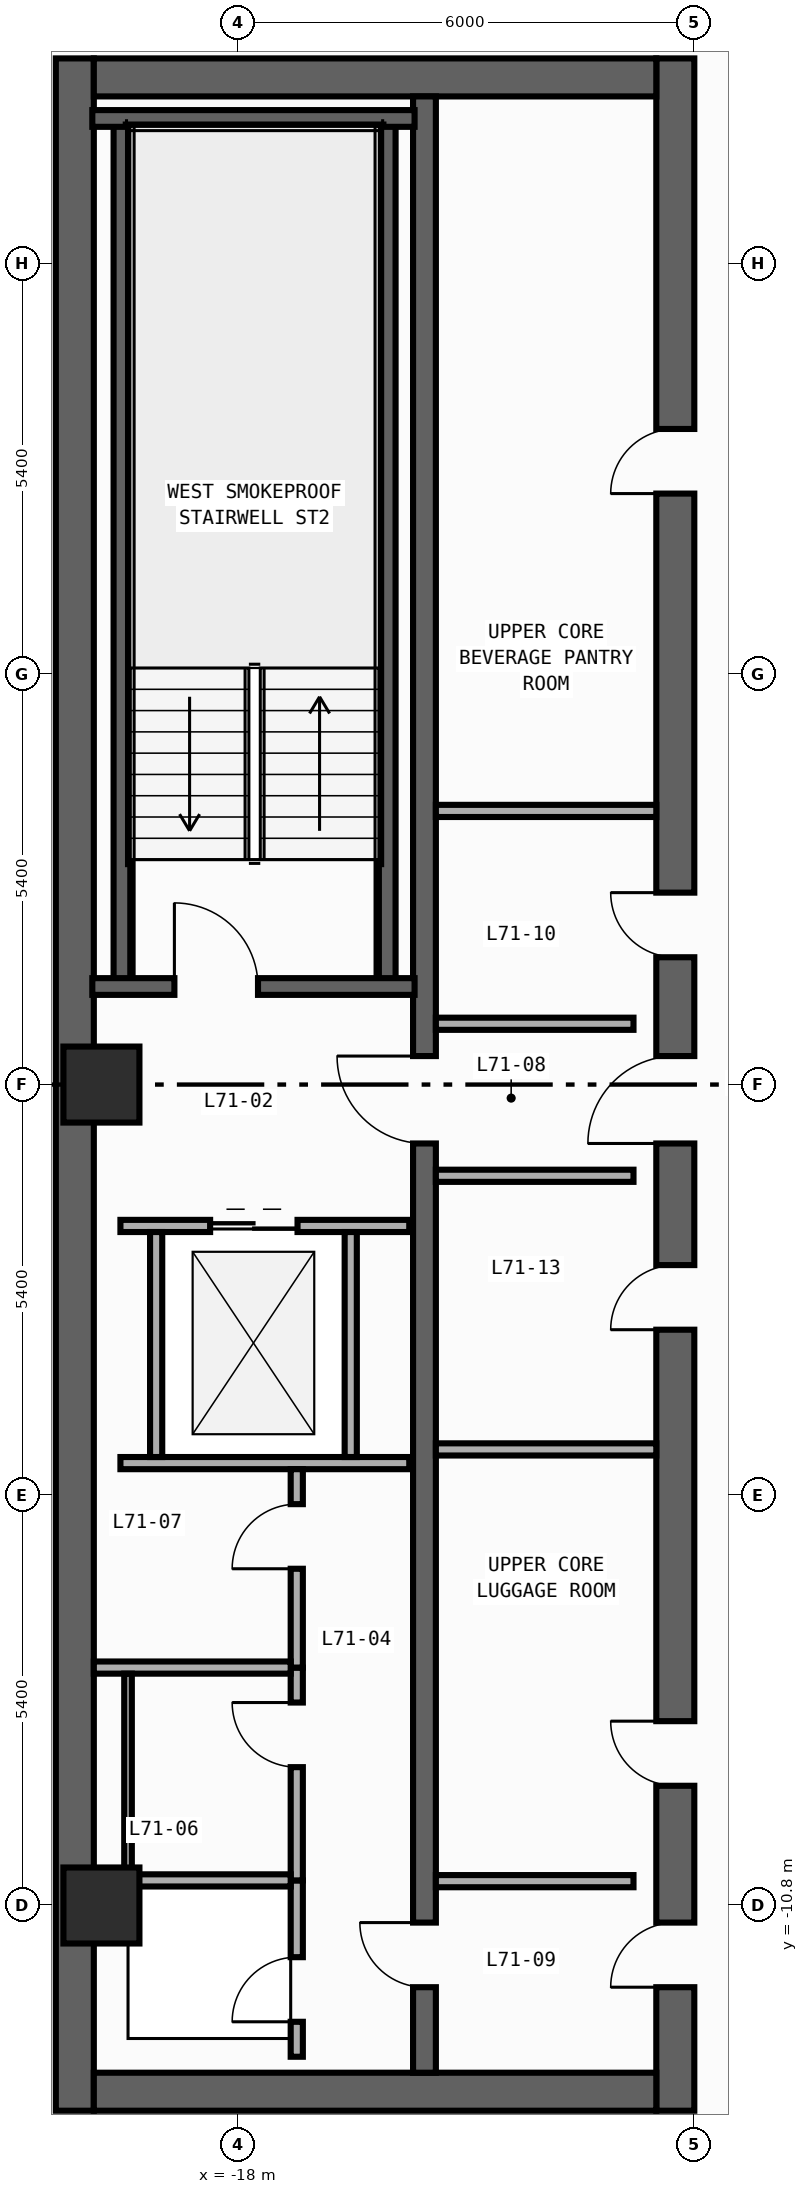
"""IFC4 building model, lengths in metres.
Left out: names, types, materials, properties, quantities, classifications, styles, units other than length and angle.
Written with IfcOpenShell. Run it as: python <this file> out.ifc"""

import sys

from ifc_helpers import new_model, si_unit, direction, frame, frame_2d, origin, origin_2d, place, context, subcontext, project, spatial, rectangle, circle, extrude, element, fill, save


model = new_model("IFC4")
c1 = context("Model", 3, precision=1e-05, world=origin(), true_north=direction((0.0, 1.0)))
c2 = subcontext(c1, "Body", "Model", "MODEL_VIEW")
j1 = project(units=[si_unit("LENGTHUNIT", "METRE"), si_unit("PLANEANGLEUNIT", "RADIAN")], contexts=[c1])
p1 = place(None, origin())
s1 = spatial("IfcSite", under=j1, at=p1, CompositionType="ELEMENT")
p2 = place(p1, origin())
s2 = spatial("IfcBuilding", under=s1, at=p2, CompositionType="ELEMENT")
p3 = place(p2, frame((0.0, 0.0, 296.6)))
s3 = spatial("IfcBuildingStorey", under=s2, at=p3, CompositionType="ELEMENT", Elevation=296.6)
p4 = place(p3, frame((-20.15, -13.5, 0.0), z_axis=(0.0, 0.0, 1.0), x_axis=(0.0, 1.0, 0.0)))
e1 = element("IfcWall", 1, at=p4, inside=s3, PredefinedType="SHEAR", context=c2, shape_type="SweptSolid", body=[
    extrude(rectangle(XDim=27.0, YDim=0.5, at=frame_2d((13.5, 0.0))), origin(), (0.0, 0.0, 1.0), 3.54),
])
p5 = place(p3, frame((-12.25, -13.5, 0.0), z_axis=(0.0, 0.0, 1.0), x_axis=(0.0, 1.0, 0.0)))
e2 = element("IfcWall", 2, at=p5, inside=s3, PredefinedType="SHEAR", context=c2, shape_type="SweptSolid", body=[
    extrude(rectangle(XDim=27.0, YDim=0.5, at=frame_2d((13.5, 0.0))), origin(), (0.0, 0.0, 1.0), 3.54),
])
p6 = place(p5, frame((15.175, 0.0, 0.0)))
e3 = element("IfcOpeningElement", 3, at=p6, cuts=e2, PredefinedType="OPENING", context=c2, shape_type="SweptSolid", body=[
    extrude(rectangle(XDim=0.85, YDim=2.1, at=frame_2d((0.425, 1.05))), frame((0.0, 0.26, 0.0), z_axis=(0.0, -1.0, 0.0), x_axis=(1.0, 0.0, 0.0)), (0.0, 0.0, 1.0), 0.52),
])
p7 = place(p5, frame((21.275, 0.0, 0.0)))
e4 = element("IfcOpeningElement", 4, at=p7, cuts=e2, PredefinedType="OPENING", context=c2, shape_type="SweptSolid", body=[
    extrude(rectangle(XDim=0.85, YDim=2.1, at=frame_2d((0.425, 1.05))), frame((0.0, 0.26, 0.0), z_axis=(0.0, -1.0, 0.0), x_axis=(1.0, 0.0, 0.0)), (0.0, 0.0, 1.0), 0.52),
])
p8 = place(p5, frame((4.275, 0.0, 0.0)))
e5 = element("IfcOpeningElement", 5, at=p8, cuts=e2, PredefinedType="OPENING", context=c2, shape_type="SweptSolid", body=[
    extrude(rectangle(XDim=0.85, YDim=2.1, at=frame_2d((0.425, 1.05))), frame((0.0, 0.26, 0.0), z_axis=(0.0, -1.0, 0.0), x_axis=(1.0, 0.0, 0.0)), (0.0, 0.0, 1.0), 0.52),
])
p9 = place(p5, frame((10.275, 0.0, 0.0)))
e6 = element("IfcOpeningElement", 6, at=p9, cuts=e2, PredefinedType="OPENING", context=c2, shape_type="SweptSolid", body=[
    extrude(rectangle(XDim=0.85, YDim=2.1, at=frame_2d((0.425, 1.05))), frame((0.0, 0.26, 0.0), z_axis=(0.0, -1.0, 0.0), x_axis=(1.0, 0.0, 0.0)), (0.0, 0.0, 1.0), 0.52),
])
p10 = place(p5, frame((12.725, 0.0, 0.0)))
e7 = element("IfcOpeningElement", 7, at=p10, cuts=e2, PredefinedType="OPENING", context=c2, shape_type="SweptSolid", body=[
    extrude(rectangle(XDim=1.15, YDim=2.2, at=frame_2d((0.575, 1.1))), frame((0.0, 0.26, 0.0), z_axis=(0.0, -1.0, 0.0), x_axis=(1.0, 0.0, 0.0)), (0.0, 0.0, 1.0), 0.52),
])
p11 = place(p5, frame((1.625, 0.0, 0.0)))
e8 = element("IfcOpeningElement", 8, at=p11, cuts=e2, PredefinedType="OPENING", context=c2, shape_type="SweptSolid", body=[
    extrude(rectangle(XDim=0.85, YDim=2.1, at=frame_2d((0.425, 1.05))), frame((0.0, 0.26, 0.0), z_axis=(0.0, -1.0, 0.0), x_axis=(1.0, 0.0, 0.0)), (0.0, 0.0, 1.0), 0.52),
])
for number, where, z_axis, x_axis in (
    (9, (-19.9, -13.25, 0.0), (0.0, 0.0, 1.0), (1.0, 0.0, 0.0)),
    (10, (-19.9, 13.25, 0.0), (0.0, 0.0, 1.0), (1.0, 0.0, 0.0)),
):
    element("IfcWall", number, at=place(p3, frame(where, z_axis=z_axis, x_axis=x_axis)), inside=s3, PredefinedType="SHEAR", context=c2, shape_type="SweptSolid", body=[
        extrude(rectangle(XDim=7.4, YDim=0.5, at=frame_2d((3.7, 0.0))), origin(), (0.0, 0.0, 1.0), 3.54),
    ])
p12 = place(p3, frame((-15.55, -13.0, 0.0), z_axis=(0.0, 0.0, 1.0), x_axis=(0.0, 1.0, 0.0)))
e11 = element("IfcWall", 11, at=p12, inside=s3, PredefinedType="SHEAR", context=c2, shape_type="SweptSolid", body=[
    extrude(rectangle(XDim=26.0, YDim=0.3, at=frame_2d((13.0, 0.0))), origin(), (0.0, 0.0, 1.0), 3.54),
])
p13 = place(p12, frame((12.225, 0.0, 0.0)))
e12 = element("IfcOpeningElement", 12, at=p13, cuts=e11, PredefinedType="OPENING", context=c2, shape_type="SweptSolid", body=[
    extrude(rectangle(XDim=1.15, YDim=2.2, at=frame_2d((0.575, 1.1))), frame((0.0, 0.16, 0.0), z_axis=(0.0, -1.0, 0.0), x_axis=(1.0, 0.0, 0.0)), (0.0, 0.0, 1.0), 0.32),
])
p14 = place(p12, frame((1.125, 0.0, 0.0)))
e13 = element("IfcOpeningElement", 13, at=p14, cuts=e11, PredefinedType="OPENING", context=c2, shape_type="SweptSolid", body=[
    extrude(rectangle(XDim=0.85, YDim=2.1, at=frame_2d((0.425, 1.05))), frame((0.0, 0.16, 0.0), z_axis=(0.0, -1.0, 0.0), x_axis=(1.0, 0.0, 0.0)), (0.0, 0.0, 1.0), 0.32),
])
for number, where, z_axis, x_axis in (
    (14, (-16.04, 1.29, 0.0), (0.0, 0.0, 1.0), (0.0, 1.0, 0.0)),
    (15, (-19.53, 1.29, 0.0), (0.0, 0.0, 1.0), (0.0, 1.0, 0.0)),
):
    element("IfcWall", number, at=place(p3, frame(where, z_axis=z_axis, x_axis=x_axis)), inside=s3, PredefinedType="SHEAR", context=c2, shape_type="SweptSolid", body=[
        extrude(rectangle(XDim=11.42, YDim=0.22, at=frame_2d((5.71, 0.0))), origin(), (0.0, 0.0, 1.0), 3.54),
    ])
p15 = place(p3, frame((-19.92, 12.71, 0.0), z_axis=(0.0, 0.0, 1.0), x_axis=(1.0, 0.0, 0.0)))
e16 = element("IfcWall", 16, at=p15, inside=s3, PredefinedType="SHEAR", context=c2, shape_type="SweptSolid", body=[
    extrude(rectangle(XDim=4.24, YDim=0.22, at=frame_2d((2.12, 0.0))), origin(), (0.0, 0.0, 1.0), 3.54),
])
p16 = place(p3, frame((-19.92, 1.29, 0.0), z_axis=(0.0, 0.0, 1.0), x_axis=(1.0, 0.0, 0.0)))
e17 = element("IfcWall", 17, at=p16, inside=s3, PredefinedType="SHEAR", context=c2, shape_type="SweptSolid", body=[
    extrude(rectangle(XDim=4.24, YDim=0.22, at=frame_2d((2.12, 0.0))), origin(), (0.0, 0.0, 1.0), 3.54),
])
p17 = place(p16, frame((1.08, 0.0, 0.0)))
e18 = element("IfcOpeningElement", 18, at=p17, cuts=e17, PredefinedType="OPENING", context=c2, shape_type="SweptSolid", body=[
    extrude(rectangle(XDim=1.1, YDim=2.2, at=frame_2d((0.55, 1.1))), frame((0.0, 0.12, 0.0), z_axis=(0.0, -1.0, 0.0), x_axis=(1.0, 0.0, 0.0)), (0.0, 0.0, 1.0), 0.24),
])
for number, where, z_axis, x_axis in (
    (19, (-19.8, -10.8, 0.0), (0.0, 0.0, 1.0), (1.0, 0.0, 0.0)),
    (20, (-19.8, 0.0, 0.0), (0.0, 0.0, 1.0), (1.0, 0.0, 0.0)),
):
    element("IfcColumn", number, at=place(p3, frame(where, z_axis=z_axis, x_axis=x_axis)), inside=s3, PredefinedType="COLUMN", context=c2, shape_type="SweptSolid", body=[
        extrude(circle(Radius=0.5, at=origin_2d()), origin(), (0.0, 0.0, 1.0), 3.8),
    ])
p18 = place(p3, frame((-19.55, -1.86, 0.0), z_axis=(0.0, 0.0, 1.0), x_axis=(1.0, 0.0, 0.0)))
e21 = element("IfcWall", 21, at=p18, inside=s3, PredefinedType="STANDARD", context=c2, shape_type="SweptSolid", body=[
    extrude(rectangle(XDim=3.8, YDim=0.16, at=frame_2d((1.9, 0.0))), origin(), (0.0, 0.0, 1.0), 3.54),
])
p19 = place(p18, frame((1.18, 0.0, 0.0)))
e22 = element("IfcOpeningElement", 22, at=p19, cuts=e21, PredefinedType="OPENING", context=c2, shape_type="SweptSolid", body=[
    extrude(rectangle(XDim=1.15, YDim=2.2, at=frame_2d((0.575, 1.1))), frame((0.0, 0.09, 0.0), z_axis=(0.0, -1.0, 0.0), x_axis=(1.0, 0.0, 0.0)), (0.0, 0.0, 1.0), 0.18),
])
p20 = place(p3, frame((-19.55, -4.98, 0.0), z_axis=(0.0, 0.0, 1.0), x_axis=(1.0, 0.0, 0.0)))
e23 = element("IfcWall", 23, at=p20, inside=s3, PredefinedType="STANDARD", context=c2, shape_type="SweptSolid", body=[
    extrude(rectangle(XDim=3.8, YDim=0.16, at=frame_2d((1.9, 0.0))), origin(), (0.0, 0.0, 1.0), 3.54),
])
for number, where, z_axis, x_axis in (
    (24, (-19.08, -4.9, 0.0), (0.0, 0.0, 1.0), (0.0, 1.0, 0.0)),
    (25, (-16.52, -4.9, 0.0), (0.0, 0.0, 1.0), (0.0, 1.0, 0.0)),
):
    element("IfcWall", number, at=place(p3, frame(where, z_axis=z_axis, x_axis=x_axis)), inside=s3, PredefinedType="STANDARD", context=c2, shape_type="SweptSolid", body=[
        extrude(rectangle(XDim=2.96, YDim=0.16, at=frame_2d((1.48, 0.0))), origin(), (0.0, 0.0, 1.0), 3.54),
    ])
for number, where, z_axis, x_axis in (
    (26, (-15.4, 0.8, 0.0), (0.0, 0.0, 1.0), (1.0, 0.0, 0.0)),
    (27, (-15.4, -1.2, 0.0), (0.0, 0.0, 1.0), (1.0, 0.0, 0.0)),
    (28, (-15.4, -10.48, 0.0), (0.0, 0.0, 1.0), (1.0, 0.0, 0.0)),
):
    element("IfcWall", number, at=place(p3, frame(where, z_axis=z_axis, x_axis=x_axis)), inside=s3, PredefinedType="STANDARD", context=c2, shape_type="SweptSolid", body=[
        extrude(rectangle(XDim=2.6, YDim=0.16, at=frame_2d((1.3, 0.0))), origin(), (0.0, 0.0, 1.0), 3.54),
    ])
p21 = place(p3, frame((-17.23, -12.79, 0.0), z_axis=(0.0, 0.0, 1.0), x_axis=(0.0, 1.0, 0.0)))
e29 = element("IfcWall", 29, at=p21, inside=s3, PredefinedType="PARTITIONING", context=c2, shape_type="SweptSolid", body=[
    extrude(rectangle(XDim=2.32, YDim=0.16, at=frame_2d((1.16, 0.0))), origin(), (0.0, 0.0, 1.0), 3.54),
])
p22 = place(p21, frame((0.46, 0.0, 0.0)))
e30 = element("IfcOpeningElement", 30, at=p22, cuts=e29, PredefinedType="OPENING", context=c2, shape_type="SweptSolid", body=[
    extrude(rectangle(XDim=0.85, YDim=2.1, at=frame_2d((0.425, 1.05))), frame((0.0, 0.09, 0.0), z_axis=(0.0, -1.0, 0.0), x_axis=(1.0, 0.0, 0.0)), (0.0, 0.0, 1.0), 0.18),
])
p23 = place(p3, frame((-17.23, -10.47, 0.0), z_axis=(0.0, 0.0, 1.0), x_axis=(0.0, 1.0, 0.0)))
e31 = element("IfcWall", 31, at=p23, inside=s3, PredefinedType="PARTITIONING", context=c2, shape_type="SweptSolid", body=[
    extrude(rectangle(XDim=2.8, YDim=0.16, at=frame_2d((1.4, 0.0))), origin(), (0.0, 0.0, 1.0), 3.54),
])
p24 = place(p23, frame((1.49, 0.0, 0.0)))
e32 = element("IfcOpeningElement", 32, at=p24, cuts=e31, PredefinedType="OPENING", context=c2, shape_type="SweptSolid", body=[
    extrude(rectangle(XDim=0.85, YDim=2.1, at=frame_2d((0.425, 1.05))), frame((0.0, 0.09, 0.0), z_axis=(0.0, -1.0, 0.0), x_axis=(1.0, 0.0, 0.0)), (0.0, 0.0, 1.0), 0.18),
])
p25 = place(p3, frame((-17.23, -7.67, 0.0), z_axis=(0.0, 0.0, 1.0), x_axis=(0.0, 1.0, 0.0)))
e33 = element("IfcWall", 33, at=p25, inside=s3, PredefinedType="PARTITIONING", context=c2, shape_type="SweptSolid", body=[
    extrude(rectangle(XDim=2.61, YDim=0.16, at=frame_2d((1.305, 0.0))), origin(), (0.0, 0.0, 1.0), 3.54),
])
p26 = place(p25, frame((1.3, 0.0, 0.0)))
e34 = element("IfcOpeningElement", 34, at=p26, cuts=e33, PredefinedType="OPENING", context=c2, shape_type="SweptSolid", body=[
    extrude(rectangle(XDim=0.85, YDim=2.1, at=frame_2d((0.425, 1.05))), frame((0.0, 0.09, 0.0), z_axis=(0.0, -1.0, 0.0), x_axis=(1.0, 0.0, 0.0)), (0.0, 0.0, 1.0), 0.18),
])
p27 = place(p3, frame((-19.75, -10.47, 0.0), z_axis=(0.0, 0.0, 1.0), x_axis=(1.0, 0.0, 0.0)))
e35 = element("IfcWall", 35, at=p27, inside=s3, PredefinedType="PARTITIONING", context=c2, shape_type="SweptSolid", body=[
    extrude(rectangle(XDim=2.44, YDim=0.16, at=frame_2d((1.22, 0.0))), origin(), (0.0, 0.0, 1.0), 3.54),
])
p28 = place(p3, frame((-19.9, -7.67, 0.0), z_axis=(0.0, 0.0, 1.0), x_axis=(1.0, 0.0, 0.0)))
e36 = element("IfcWall", 36, at=p28, inside=s3, PredefinedType="PARTITIONING", context=c2, shape_type="SweptSolid", body=[
    extrude(rectangle(XDim=2.59, YDim=0.16, at=frame_2d((1.295, 0.0))), origin(), (0.0, 0.0, 1.0), 3.54),
])
for number, where, z_axis, x_axis in (
    (37, (-15.4, 3.6, 0.0), (0.0, 0.0, 1.0), (1.0, 0.0, 0.0)),
    (38, (-15.4, -4.8, 0.0), (0.0, 0.0, 1.0), (1.0, 0.0, 0.0)),
):
    element("IfcWall", number, at=place(p3, frame(where, z_axis=z_axis, x_axis=x_axis)), inside=s3, PredefinedType="PARTITIONING", context=c2, shape_type="SweptSolid", body=[
        extrude(rectangle(XDim=2.9, YDim=0.16, at=frame_2d((1.45, 0.0))), origin(), (0.0, 0.0, 1.0), 3.54),
    ])
p29 = place(p3, frame((-19.45, -10.39, 0.0), z_axis=(0.0, 0.0, 1.0), x_axis=(0.0, 1.0, 0.0)))
e39 = element("IfcWall", 39, at=p29, inside=s3, PredefinedType="PARTITIONING", context=c2, shape_type="SweptSolid", body=[
    extrude(rectangle(XDim=2.64, YDim=0.1, at=frame_2d((1.32, 0.0))), origin(), (0.0, 0.0, 1.0), 3.54),
])
p30 = place(p17, origin())
e40 = element("IfcDoor", 40, at=p30, inside=s3, OperationType="SINGLE_SWING_LEFT", PredefinedType="DOOR", context=c2, shape_type="SweptSolid", body=[
    extrude(rectangle(XDim=1.1, YDim=2.2, at=frame_2d((0.55, 1.1))), frame((0.0, 0.025, 0.0), z_axis=(0.0, -1.0, 0.0), x_axis=(1.0, 0.0, 0.0)), (0.0, 0.0, 1.0), 0.05),
])
fill(e18, e40)
p31 = place(p6, origin())
e41 = element("IfcDoor", 41, at=p31, inside=s3, OperationType="SINGLE_SWING_RIGHT", PredefinedType="DOOR", context=c2, shape_type="SweptSolid", body=[
    extrude(rectangle(XDim=0.85, YDim=2.1, at=frame_2d((0.425, 1.05))), frame((0.0, 0.025, 0.0), z_axis=(0.0, -1.0, 0.0), x_axis=(1.0, 0.0, 0.0)), (0.0, 0.0, 1.0), 0.05),
])
fill(e3, e41)
p32 = place(p7, origin())
e42 = element("IfcDoor", 42, at=p32, inside=s3, OperationType="SINGLE_SWING_LEFT", PredefinedType="DOOR", context=c2, shape_type="SweptSolid", body=[
    extrude(rectangle(XDim=0.85, YDim=2.1, at=frame_2d((0.425, 1.05))), frame((0.0, 0.025, 0.0), z_axis=(0.0, -1.0, 0.0), x_axis=(1.0, 0.0, 0.0)), (0.0, 0.0, 1.0), 0.05),
])
fill(e4, e42)
p33 = place(p8, origin())
e43 = element("IfcDoor", 43, at=p33, inside=s3, OperationType="SINGLE_SWING_RIGHT", PredefinedType="DOOR", context=c2, shape_type="SweptSolid", body=[
    extrude(rectangle(XDim=0.85, YDim=2.1, at=frame_2d((0.425, 1.05))), frame((0.0, 0.025, 0.0), z_axis=(0.0, -1.0, 0.0), x_axis=(1.0, 0.0, 0.0)), (0.0, 0.0, 1.0), 0.05),
])
fill(e5, e43)
p34 = place(p9, origin())
e44 = element("IfcDoor", 44, at=p34, inside=s3, OperationType="SINGLE_SWING_LEFT", PredefinedType="DOOR", context=c2, shape_type="SweptSolid", body=[
    extrude(rectangle(XDim=0.85, YDim=2.1, at=frame_2d((0.425, 1.05))), frame((0.0, 0.025, 0.0), z_axis=(0.0, -1.0, 0.0), x_axis=(1.0, 0.0, 0.0)), (0.0, 0.0, 1.0), 0.05),
])
fill(e6, e44)
p35 = place(p10, origin())
e45 = element("IfcDoor", 45, at=p35, inside=s3, OperationType="SINGLE_SWING_LEFT", PredefinedType="DOOR", context=c2, shape_type="SweptSolid", body=[
    extrude(rectangle(XDim=1.15, YDim=2.2, at=frame_2d((0.575, 1.1))), frame((0.0, 0.025, 0.0), z_axis=(0.0, -1.0, 0.0), x_axis=(1.0, 0.0, 0.0)), (0.0, 0.0, 1.0), 0.05),
])
fill(e7, e45)
p36 = place(p13, origin())
e46 = element("IfcDoor", 46, at=p36, inside=s3, OperationType="SINGLE_SWING_RIGHT", PredefinedType="DOOR", context=c2, shape_type="SweptSolid", body=[
    extrude(rectangle(XDim=1.15, YDim=2.2, at=frame_2d((0.575, 1.1))), frame((0.0, 0.025, 0.0), z_axis=(0.0, -1.0, 0.0), x_axis=(1.0, 0.0, 0.0)), (0.0, 0.0, 1.0), 0.05),
])
fill(e12, e46)
p37 = place(p11, origin())
e47 = element("IfcDoor", 47, at=p37, inside=s3, OperationType="SINGLE_SWING_LEFT", PredefinedType="DOOR", context=c2, shape_type="SweptSolid", body=[
    extrude(rectangle(XDim=0.85, YDim=2.1, at=frame_2d((0.425, 1.05))), frame((0.0, 0.025, 0.0), z_axis=(0.0, -1.0, 0.0), x_axis=(1.0, 0.0, 0.0)), (0.0, 0.0, 1.0), 0.05),
])
fill(e8, e47)
p38 = place(p14, origin())
e48 = element("IfcDoor", 48, at=p38, inside=s3, OperationType="SINGLE_SWING_RIGHT", PredefinedType="DOOR", context=c2, shape_type="SweptSolid", body=[
    extrude(rectangle(XDim=0.85, YDim=2.1, at=frame_2d((0.425, 1.05))), frame((0.0, 0.025, 0.0), z_axis=(0.0, -1.0, 0.0), x_axis=(1.0, 0.0, 0.0)), (0.0, 0.0, 1.0), 0.05),
])
fill(e13, e48)
p39 = place(p19, origin())
e49 = element("IfcDoor", 49, at=p39, inside=s3, OperationType="DOUBLE_DOOR_SLIDING", PredefinedType="DOOR", context=c2, shape_type="SweptSolid", body=[
    extrude(rectangle(XDim=1.15, YDim=2.2, at=frame_2d((0.575, 1.1))), frame((0.0, 0.025, 0.0), z_axis=(0.0, -1.0, 0.0), x_axis=(1.0, 0.0, 0.0)), (0.0, 0.0, 1.0), 0.05),
])
fill(e22, e49)
p40 = place(p22, origin())
e50 = element("IfcDoor", 50, at=p40, inside=s3, OperationType="SINGLE_SWING_LEFT", PredefinedType="DOOR", context=c2, shape_type="SweptSolid", body=[
    extrude(rectangle(XDim=0.85, YDim=2.1, at=frame_2d((0.425, 1.05))), frame((0.0, 0.025, 0.0), z_axis=(0.0, -1.0, 0.0), x_axis=(1.0, 0.0, 0.0)), (0.0, 0.0, 1.0), 0.05),
])
fill(e30, e50)
p41 = place(p24, origin())
e51 = element("IfcDoor", 51, at=p41, inside=s3, OperationType="SINGLE_SWING_RIGHT", PredefinedType="DOOR", context=c2, shape_type="SweptSolid", body=[
    extrude(rectangle(XDim=0.85, YDim=2.1, at=frame_2d((0.425, 1.05))), frame((0.0, 0.025, 0.0), z_axis=(0.0, -1.0, 0.0), x_axis=(1.0, 0.0, 0.0)), (0.0, 0.0, 1.0), 0.05),
])
fill(e32, e51)
p42 = place(p26, origin())
e52 = element("IfcDoor", 52, at=p42, inside=s3, OperationType="SINGLE_SWING_LEFT", PredefinedType="DOOR", context=c2, shape_type="SweptSolid", body=[
    extrude(rectangle(XDim=0.85, YDim=2.1, at=frame_2d((0.425, 1.05))), frame((0.0, 0.025, 0.0), z_axis=(0.0, -1.0, 0.0), x_axis=(1.0, 0.0, 0.0)), (0.0, 0.0, 1.0), 0.05),
])
fill(e34, e52)
save(model, sys.argv[1])
